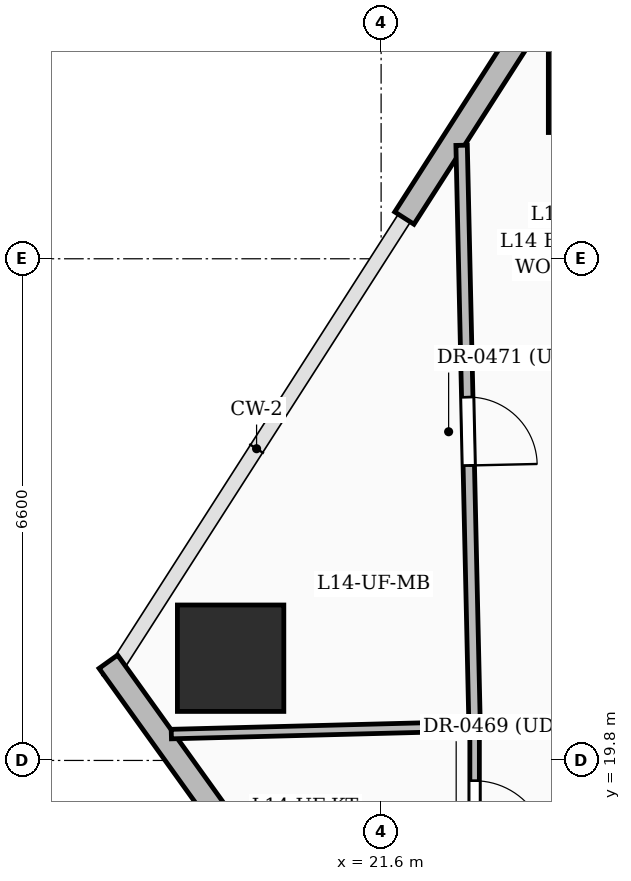
"""IFC4 building model, lengths in metres.
Left out: names, types, materials, properties, quantities, classifications, styles, units other than length and angle.
Written with IfcOpenShell. Run it as: python <this file> out.ifc"""

import sys

from ifc_helpers import new_model, si_unit, direction, frame, frame_2d, origin, origin_2d, place, context, subcontext, project, spatial, rectangle, extrude, element, fill, save


model = new_model("IFC4")
c1 = context("Model", 3, precision=1e-05, world=origin(), true_north=direction((0.0, 1.0)))
c2 = subcontext(c1, "Body", "Model", "MODEL_VIEW")
j1 = project(units=[si_unit("LENGTHUNIT", "METRE"), si_unit("PLANEANGLEUNIT", "RADIAN")], contexts=[c1])
p1 = place(None, origin())
s1 = spatial("IfcSite", under=j1, at=p1, CompositionType="ELEMENT")
p2 = place(p1, origin())
s2 = spatial("IfcBuilding", under=s1, at=p2, CompositionType="ELEMENT")
p3 = place(p2, frame((0.0, 0.0, 60.6)))
s3 = spatial("IfcBuildingStorey", under=s2, at=p3, CompositionType="ELEMENT", Elevation=60.6)
for number, where, z_axis, x_axis in (
    (1, (24.5, 28.761, 0.0), (0.0, 0.0, 1.0), (1.0, 0.0, 0.0)),
    (2, (19.62, 21.145, 0.0), (0.0, 0.0, 1.0), (1.0, 0.0, 0.0)),
):
    element("IfcColumn", number, at=place(p3, frame(where, z_axis=z_axis, x_axis=x_axis)), inside=s3, PredefinedType="COLUMN", context=c2, shape_type="SweptSolid", body=[
        extrude(rectangle(XDim=1.4, YDim=1.4, at=origin_2d()), origin(), (0.0, 0.0, 1.0), 3.6),
    ])
p4 = place(p3, frame((19.524, 18.991, 0.0), z_axis=(0.0, 0.0, 1.0), x_axis=(-0.58299973372, 0.812472344442, 0.0)))
e3 = element("IfcWall", 3, at=p4, inside=s3, PredefinedType="SOLIDWALL", context=c2, shape_type="SweptSolid", body=[
    extrude(rectangle(XDim=2.594, YDim=0.3, at=frame_2d((1.297, 0.0))), origin(), (0.0, 0.0, 1.0), 2.375),
])
p5 = place(p3, frame((21.906, 26.935, 0.0), z_axis=(0.0, 0.0, 1.0), x_axis=(0.5395054239, 0.841982124265, 0.0)))
e4 = element("IfcWall", 4, at=p5, inside=s3, PredefinedType="SOLIDWALL", context=c2, shape_type="SweptSolid", body=[
    extrude(rectangle(XDim=7.207, YDim=0.3, at=frame_2d((3.604, 0.0))), origin(), (0.0, 0.0, 1.0), 3.35),
])
p6 = place(p5, frame((4.675, 0.0, 0.8)))
e5 = element("IfcOpeningElement", 5, at=p6, cuts=e4, PredefinedType="OPENING", context=c2, shape_type="SweptSolid", body=[
    extrude(rectangle(XDim=1.2, YDim=1.8, at=frame_2d((0.6, 0.9))), frame((0.0, 0.16, 0.0), z_axis=(0.0, -1.0, 0.0), x_axis=(1.0, 0.0, 0.0)), (0.0, 0.0, 1.0), 0.32),
])
p7 = place(p3, frame((22.83, 20.25, 0.0), z_axis=(0.0, 0.0, 1.0), x_axis=(0.0, -1.0, 0.0)))
e6 = element("IfcWall", 6, at=p7, inside=s3, PredefinedType="PARTITIONING", context=c2, shape_type="SweptSolid", body=[
    extrude(rectangle(XDim=2.415, YDim=0.125, at=frame_2d((1.208, 0.0))), origin(), (0.0, 0.0, 1.0), 2.279),
])
p8 = place(p7, frame((0.717, 0.0, 0.0)))
e7 = element("IfcOpeningElement", 7, at=p8, cuts=e6, PredefinedType="OPENING", context=c2, shape_type="SweptSolid", body=[
    extrude(rectangle(XDim=0.95, YDim=2.2, at=frame_2d((0.475, 1.1))), frame((0.0, 0.072, 0.0), z_axis=(0.0, -1.0, 0.0), x_axis=(1.0, 0.0, 0.0)), (0.0, 0.0, 1.0), 0.145),
])
p9 = place(p3, frame((22.659, 27.893, 0.0), z_axis=(0.0, 0.0, 1.0), x_axis=(0.022386262274, -0.99974939623, 0.0)))
e8 = element("IfcWall", 8, at=p9, inside=s3, PredefinedType="PARTITIONING", context=c2, shape_type="SweptSolid", body=[
    extrude(rectangle(XDim=7.645, YDim=0.15, at=frame_2d((3.823, 0.0))), origin(), (0.0, 0.0, 1.0), 2.37),
])
p10 = place(p9, frame((3.314, 0.0, 0.0)))
e9 = element("IfcOpeningElement", 9, at=p10, cuts=e8, PredefinedType="OPENING", context=c2, shape_type="SweptSolid", body=[
    extrude(rectangle(XDim=0.9, YDim=2.15, at=frame_2d((0.45, 1.075))), frame((0.0, 0.085, 0.0), z_axis=(0.0, -1.0, 0.0), x_axis=(1.0, 0.0, 0.0)), (0.0, 0.0, 1.0), 0.17),
])
p11 = place(p3, frame((23.818, 17.833, 0.0), z_axis=(0.0, 0.0, 1.0), x_axis=(0.215621860536, 0.976476939441, 0.0)))
e10 = element("IfcWall", 10, at=p11, inside=s3, PredefinedType="PARTITIONING", context=c2, shape_type="SweptSolid", body=[
    extrude(rectangle(XDim=12.052, YDim=0.2, at=frame_2d((6.026, 0.0))), origin(), (0.0, 0.0, 1.0), 2.279),
])
p12 = place(p3, frame((22.782, 20.249, 0.0), z_axis=(0.0, 0.0, 1.0), x_axis=(-0.999665137203, -0.025876890473, 0.0)))
e11 = element("IfcWall", 11, at=p12, inside=s3, PredefinedType="PARTITIONING", context=c2, shape_type="SweptSolid", body=[
    extrude(rectangle(XDim=3.944, YDim=0.125, at=frame_2d((1.972, 0.0))), origin(), (0.0, 0.0, 1.0), 2.279),
])
p13 = place(p8, origin())
e12 = element("IfcDoor", 12, at=p13, inside=s3, OperationType="SINGLE_SWING_RIGHT", PredefinedType="DOOR", context=c2, shape_type="SweptSolid", body=[
    extrude(rectangle(XDim=0.95, YDim=2.2, at=frame_2d((0.475, 1.1))), frame((0.0, 0.025, 0.0), z_axis=(0.0, -1.0, 0.0), x_axis=(1.0, 0.0, 0.0)), (0.0, 0.0, 1.0), 0.05),
])
fill(e7, e12)
p14 = place(p10, origin())
e13 = element("IfcDoor", 13, at=p14, inside=s3, OperationType="SINGLE_SWING_RIGHT", PredefinedType="DOOR", context=c2, shape_type="SweptSolid", body=[
    extrude(rectangle(XDim=0.9, YDim=2.15, at=frame_2d((0.45, 1.075))), frame((0.0, 0.025, 0.0), z_axis=(0.0, -1.0, 0.0), x_axis=(1.0, 0.0, 0.0)), (0.0, 0.0, 1.0), 0.05),
])
fill(e9, e13)
save(model, sys.argv[1])
